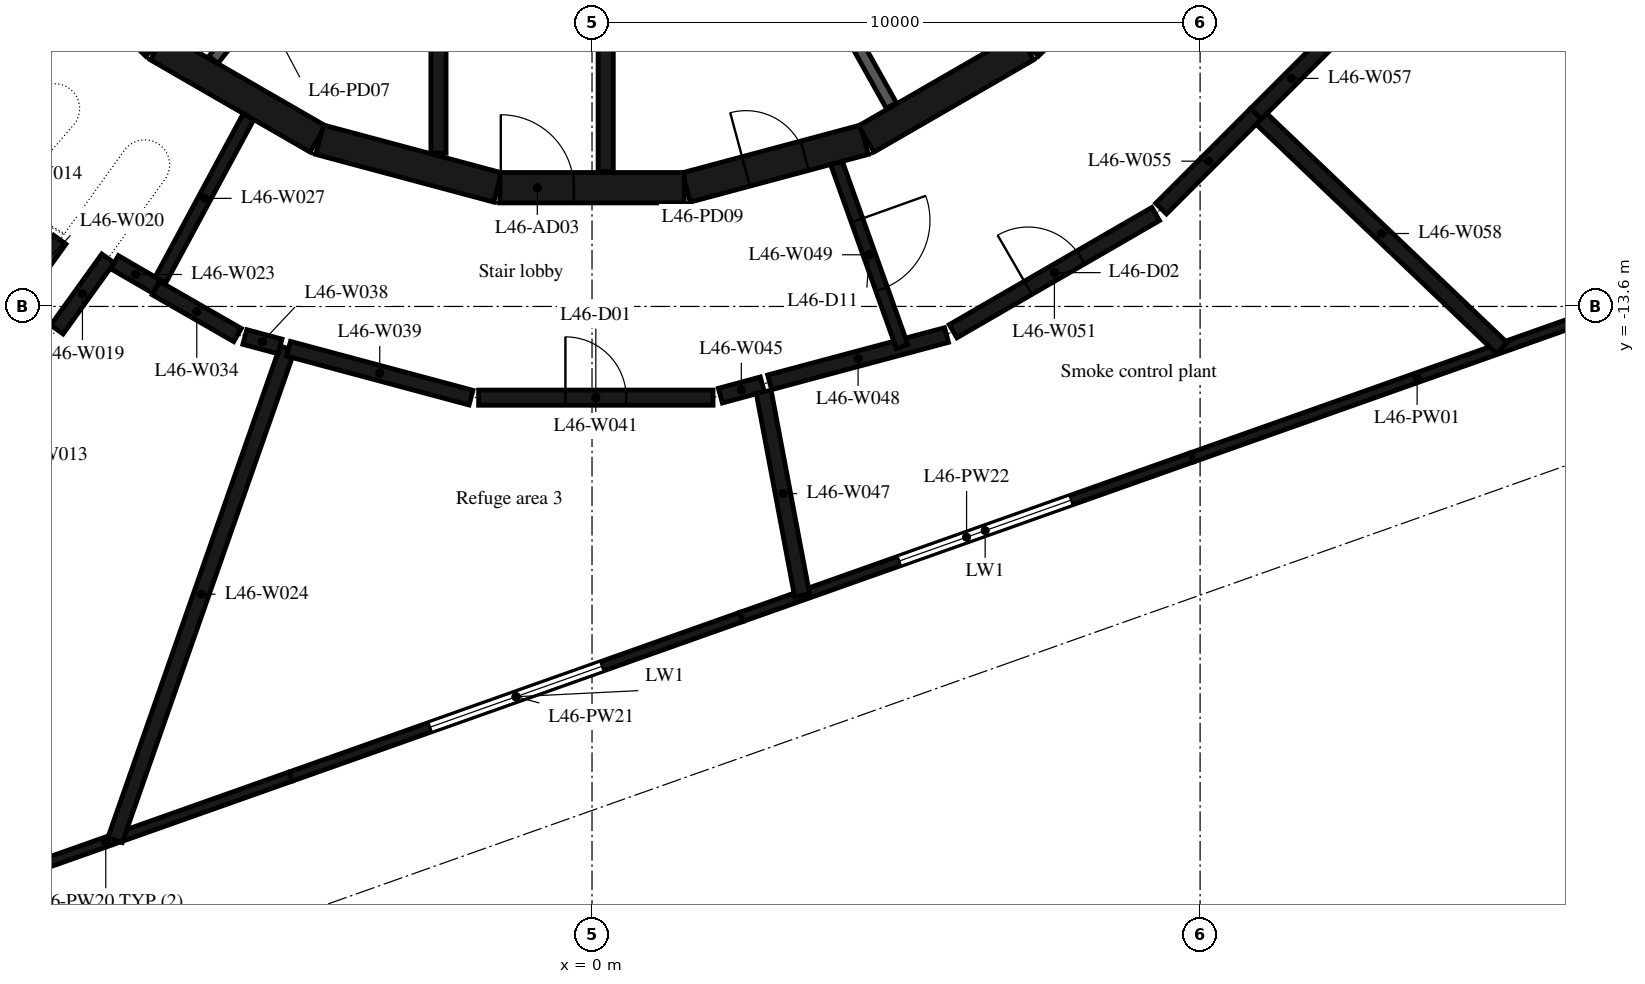
"""IFC4 building model, lengths in metres.
Left out: names, types, materials, properties, quantities, classifications, styles, units other than length and angle.
Written with IfcOpenShell. Run it as: python <this file> out.ifc"""

import sys

from ifc_helpers import new_model, si_unit, direction, frame, frame_2d, origin, place, context, subcontext, project, spatial, rectangle, extrude, element, fill, save


model = new_model("IFC4")
c1 = context("Model", 3, precision=1e-05, world=origin(), true_north=direction((0.0, 1.0)))
c2 = subcontext(c1, "Body", "Model", "MODEL_VIEW")
j1 = project(units=[si_unit("LENGTHUNIT", "METRE"), si_unit("PLANEANGLEUNIT", "RADIAN")], contexts=[c1])
p1 = place(None, origin())
s1 = spatial("IfcSite", under=j1, at=p1, CompositionType="ELEMENT")
p2 = place(p1, origin())
s2 = spatial("IfcBuilding", under=s1, at=p2, CompositionType="ELEMENT")
p3 = place(p2, frame((0.0, 0.0, 183.2)))
s3 = spatial("IfcBuildingStorey", under=s2, at=p3, CompositionType="ELEMENT", Elevation=183.2)
p4 = place(p3, frame((9.864, -16.083, 0.0), z_axis=(0.0, 0.0, 1.0), x_axis=(0.942652676872, 0.333775269883, 0.0)))
e1 = element("IfcWall", 1, at=p4, inside=s3, PredefinedType="STANDARD", context=c2, shape_type="SweptSolid", body=[
    extrude(rectangle(XDim=7.86, YDim=0.16, at=frame_2d((3.93, 0.0))), origin(), (0.0, 0.0, 1.0), 4.75),
])
p5 = place(p3, frame((-11.039, -23.485, 0.0), z_axis=(0.0, 0.0, 1.0), x_axis=(0.94263788719, 0.333817036165, 0.0)))
e2 = element("IfcWall", 2, at=p5, inside=s3, PredefinedType="STANDARD", context=c2, shape_type="SweptSolid", body=[
    extrude(rectangle(XDim=6.455, YDim=0.16, at=frame_2d((3.228, 0.0))), origin(), (0.0, 0.0, 1.0), 4.75),
])
p6 = place(p3, frame((-4.954, -21.33, 0.0), z_axis=(0.0, 0.0, 1.0), x_axis=(0.942639442898, 0.333812643101, 0.0)))
e3 = element("IfcWall", 3, at=p6, inside=s3, PredefinedType="STANDARD", context=c2, shape_type="SweptSolid", body=[
    extrude(rectangle(XDim=7.86, YDim=0.16, at=frame_2d((3.93, 0.0))), origin(), (0.0, 0.0, 1.0), 4.75),
])
p7 = place(p6, frame((2.43, 0.0, 1.0)))
e4 = element("IfcOpeningElement", 4, at=p7, cuts=e3, PredefinedType="OPENING", context=c2, shape_type="SweptSolid", body=[
    extrude(rectangle(XDim=3.0, YDim=2.2, at=frame_2d((1.5, 1.1))), frame((0.0, 0.09, 0.0), z_axis=(0.0, -1.0, 0.0), x_axis=(1.0, 0.0, 0.0)), (0.0, 0.0, 1.0), 0.18),
])
p8 = place(p3, frame((2.455, -18.706, 0.0), z_axis=(0.0, 0.0, 1.0), x_axis=(0.942639442898, 0.333812643101, 0.0)))
e5 = element("IfcWall", 5, at=p8, inside=s3, PredefinedType="STANDARD", context=c2, shape_type="SweptSolid", body=[
    extrude(rectangle(XDim=7.86, YDim=0.16, at=frame_2d((3.93, 0.0))), origin(), (0.0, 0.0, 1.0), 4.75),
])
p9 = place(p8, frame((2.754, 0.0, 1.0)))
e6 = element("IfcOpeningElement", 6, at=p9, cuts=e5, PredefinedType="OPENING", context=c2, shape_type="SweptSolid", body=[
    extrude(rectangle(XDim=3.0, YDim=2.2, at=frame_2d((1.5, 1.1))), frame((0.0, 0.09, 0.0), z_axis=(0.0, -1.0, 0.0), x_axis=(1.0, 0.0, 0.0)), (0.0, 0.0, 1.0), 0.18),
])
p10 = place(p3, frame((1.55, -11.643, 0.0), z_axis=(0.0, 0.0, 1.0), x_axis=(0.965948410781, 0.258734743916, 0.0)))
e7 = element("IfcWall", 7, at=p10, inside=s3, PredefinedType="SHEAR", context=c2, shape_type="SweptSolid", body=[
    extrude(rectangle(XDim=3.033, YDim=0.5, at=frame_2d((1.516, 0.0))), origin(), (0.0, 0.0, 1.0), 4.75),
])
p11 = place(p10, frame((1.016, 0.0, 0.0)))
e8 = element("IfcOpeningElement", 8, at=p11, cuts=e7, PredefinedType="OPENING", context=c2, shape_type="SweptSolid", body=[
    extrude(rectangle(XDim=1.0, YDim=2.4, at=frame_2d((0.5, 1.2))), frame((0.0, 0.26, 0.0), z_axis=(0.0, -1.0, 0.0), x_axis=(1.0, 0.0, 0.0)), (0.0, 0.0, 1.0), 0.52),
])
p12 = place(p3, frame((4.51, -10.845, 0.0), z_axis=(0.0, 0.0, 1.0), x_axis=(0.865975092491, 0.500087131594, 0.0)))
e9 = element("IfcWall", 9, at=p12, inside=s3, PredefinedType="SHEAR", context=c2, shape_type="SweptSolid", body=[
    extrude(rectangle(XDim=3.033, YDim=0.5, at=frame_2d((1.516, 0.0))), origin(), (0.0, 0.0, 1.0), 4.75),
])
p13 = place(p3, frame((7.164, -9.308, 0.0), z_axis=(0.0, 0.0, 1.0), x_axis=(0.707106781187, 0.707106781187, 0.0)))
e10 = element("IfcWall", 10, at=p13, inside=s3, PredefinedType="SHEAR", context=c2, shape_type="SweptSolid", body=[
    extrude(rectangle(XDim=3.032, YDim=0.5, at=frame_2d((1.516, 0.0))), origin(), (0.0, 0.0, 1.0), 4.75),
])
p14 = place(p13, frame((1.016, 0.0, 0.0)))
e11 = element("IfcOpeningElement", 11, at=p14, cuts=e10, PredefinedType="OPENING", context=c2, shape_type="SweptSolid", body=[
    extrude(rectangle(XDim=1.0, YDim=2.4, at=frame_2d((0.5, 1.2))), frame((0.0, 0.26, 0.0), z_axis=(0.0, -1.0, 0.0), x_axis=(1.0, 0.0, 0.0)), (0.0, 0.0, 1.0), 0.52),
])
p15 = place(p3, frame((-9.308, -7.164, 0.0), z_axis=(0.0, 0.0, 1.0), x_axis=(0.707106781187, -0.707106781187, 0.0)))
e12 = element("IfcWall", 12, at=p15, inside=s3, PredefinedType="SHEAR", context=c2, shape_type="SweptSolid", body=[
    extrude(rectangle(XDim=3.032, YDim=0.5, at=frame_2d((1.516, 0.0))), origin(), (0.0, 0.0, 1.0), 4.75),
])
for number, where, z_axis, x_axis in (
    (13, (-7.137, -9.329, 0.0), (0.0, 0.0, 1.0), (0.866, -0.5, 0.0)),
    (14, (-4.479, -10.858, 0.0), (0.0, 0.0, 1.0), (0.966, -0.259, 0.0)),
):
    element("IfcWall", number, at=place(p3, frame(where, z_axis=z_axis, x_axis=x_axis)), inside=s3, PredefinedType="SHEAR", context=c2, shape_type="SweptSolid", body=[
        extrude(rectangle(XDim=3.033, YDim=0.5, at=frame_2d((1.516, 0.0))), origin(), (0.0, 0.0, 1.0), 4.75),
    ])
p16 = place(p3, frame((-1.516, -11.647, 0.0), z_axis=(0.0, 0.0, 1.0), x_axis=(1.0, 0.0, 0.0)))
e15 = element("IfcWall", 15, at=p16, inside=s3, PredefinedType="SHEAR", context=c2, shape_type="SweptSolid", body=[
    extrude(rectangle(XDim=3.033, YDim=0.5, at=frame_2d((1.516, 0.0))), origin(), (0.0, 0.0, 1.0), 4.75),
])
p17 = place(p16, frame((0.016, 0.0, 0.0)))
e16 = element("IfcOpeningElement", 16, at=p17, cuts=e15, PredefinedType="OPENING", context=c2, shape_type="SweptSolid", body=[
    extrude(rectangle(XDim=1.2, YDim=2.1, at=frame_2d((0.6, 1.05))), frame((0.0, 0.26, 0.0), z_axis=(0.0, -1.0, 0.0), x_axis=(1.0, 0.0, 0.0)), (0.0, 0.0, 1.0), 0.52),
])
p18 = place(p3, frame((-2.525, -8.97, 0.0), z_axis=(0.0, 0.0, 1.0), x_axis=(0.0, -1.0, 0.0)))
e17 = element("IfcWall", 17, at=p18, inside=s3, PredefinedType="SHEAR", context=c2, shape_type="SweptSolid", body=[
    extrude(rectangle(XDim=2.11, YDim=0.25, at=frame_2d((1.055, 0.0))), origin(), (0.0, 0.0, 1.0), 4.75),
])
p19 = place(p3, frame((0.225, -8.97, 0.0), z_axis=(0.0, 0.0, 1.0), x_axis=(0.0, -1.0, 0.0)))
e18 = element("IfcWall", 18, at=p19, inside=s3, PredefinedType="SHEAR", context=c2, shape_type="SweptSolid", body=[
    extrude(rectangle(XDim=2.41, YDim=0.25, at=frame_2d((1.205, 0.0))), origin(), (0.0, 0.0, 1.0), 4.75),
])
p20 = place(p3, frame((4.922, -10.296, 0.0), z_axis=(0.0, 0.0, 1.0), x_axis=(-0.48860846254, 0.872503163509, 0.0)))
e19 = element("IfcWall", 19, at=p20, inside=s3, PredefinedType="PARTITIONING", context=c2, shape_type="SweptSolid", body=[
    extrude(rectangle(XDim=1.459, YDim=0.19, at=frame_2d((0.73, 0.0))), origin(), (0.0, 0.0, 1.0), 4.75),
])
p21 = place(p3, frame((-4.706, -7.625, 0.0), z_axis=(0.0, 0.0, 1.0), x_axis=(-0.621392599334, -0.783499353856, 0.0)))
e20 = element("IfcWall", 20, at=p21, inside=s3, PredefinedType="PARTITIONING", context=c2, shape_type="SweptSolid", body=[
    extrude(rectangle(XDim=2.447, YDim=0.19, at=frame_2d((1.224, 0.0))), origin(), (0.0, 0.0, 1.0), 4.75),
])
p22 = place(p21, frame((0.724, 0.0, 0.0)))
e21 = element("IfcOpeningElement", 21, at=p22, cuts=e20, PredefinedType="OPENING", context=c2, shape_type="SweptSolid", body=[
    extrude(rectangle(XDim=1.0, YDim=2.4, at=frame_2d((0.5, 1.2))), frame((0.0, 0.105, 0.0), z_axis=(0.0, -1.0, 0.0), x_axis=(1.0, 0.0, 0.0)), (0.0, 0.0, 1.0), 0.21),
])
p23 = place(p3, frame((-8.8, -13.98, 0.0), z_axis=(0.0, 0.0, 1.0), x_axis=(0.583272745403, 0.812276371976, 0.0)))
e22 = element("IfcWall", 22, at=p23, inside=s3, PredefinedType="PARTITIONING", context=c2, shape_type="SweptSolid", body=[
    extrude(rectangle(XDim=1.44, YDim=0.25, at=frame_2d((0.72, 0.0))), origin(), (0.0, 0.0, 1.0), 4.75),
])
p24 = place(p3, frame((-8.753, -12.501, 0.0), z_axis=(0.0, 0.0, 1.0), x_axis=(-0.583284065891, -0.812268242933, 0.0)))
e23 = element("IfcWall", 23, at=p24, inside=s3, PredefinedType="PARTITIONING", context=c2, shape_type="SweptSolid", body=[
    extrude(rectangle(XDim=1.229, YDim=0.25, at=frame_2d((0.615, 0.0))), origin(), (0.0, 0.0, 1.0), 4.75),
])
p25 = place(p3, frame((-7.852, -12.873, 0.0), z_axis=(0.0, 0.0, 1.0), x_axis=(0.865197326025, -0.501431537739, 0.0)))
e24 = element("IfcWall", 24, at=p25, inside=s3, PredefinedType="PARTITIONING", context=c2, shape_type="SweptSolid", body=[
    extrude(rectangle(XDim=0.803, YDim=0.25, at=frame_2d((0.402, 0.0))), origin(), (0.0, 0.0, 1.0), 4.75),
])
p26 = place(p3, frame((-7.844, -22.375, 0.0), z_axis=(0.0, 0.0, 1.0), x_axis=(0.330759154165, 0.943715201709, 0.0)))
e25 = element("IfcWall", 25, at=p26, inside=s3, PredefinedType="PARTITIONING", context=c2, shape_type="SweptSolid", body=[
    extrude(rectangle(XDim=8.567, YDim=0.25, at=frame_2d((4.283, 0.0))), origin(), (0.0, 0.0, 1.0), 4.75),
])
p27 = place(p3, frame((-7.097, -13.165, 0.0), z_axis=(0.0, 0.0, 1.0), x_axis=(0.474500660471, 0.880255146655, 0.0)))
e26 = element("IfcWall", 26, at=p27, inside=s3, PredefinedType="PARTITIONING", context=c2, shape_type="SweptSolid", body=[
    extrude(rectangle(XDim=3.051, YDim=0.2, at=frame_2d((1.525, 0.0))), origin(), (0.0, 0.0, 1.0), 4.75),
])
p28 = place(p3, frame((-5.83, -14.07, 0.0), z_axis=(0.0, 0.0, 1.0), x_axis=(-0.867015512993, 0.498281145769, 0.0)))
e27 = element("IfcWall", 27, at=p28, inside=s3, PredefinedType="PARTITIONING", context=c2, shape_type="SweptSolid", body=[
    extrude(rectangle(XDim=1.545, YDim=0.25, at=frame_2d((0.773, 0.0))), origin(), (0.0, 0.0, 1.0), 4.75),
])
p29 = place(p3, frame((-5.131, -14.258, 0.0), z_axis=(0.0, 0.0, 1.0), x_axis=(-0.965827909732, 0.259184198561, 0.0)))
e28 = element("IfcWall", 28, at=p29, inside=s3, PredefinedType="PARTITIONING", context=c2, shape_type="SweptSolid", body=[
    extrude(rectangle(XDim=0.599, YDim=0.25, at=frame_2d((0.3, 0.0))), origin(), (0.0, 0.0, 1.0), 4.75),
])
p30 = place(p3, frame((-4.992, -14.295, 0.0), z_axis=(0.0, 0.0, 1.0), x_axis=(0.965855783514, -0.259080306956, 0.0)))
e29 = element("IfcWall", 29, at=p30, inside=s3, PredefinedType="PARTITIONING", context=c2, shape_type="SweptSolid", body=[
    extrude(rectangle(XDim=3.108, YDim=0.25, at=frame_2d((1.554, 0.0))), origin(), (0.0, 0.0, 1.0), 4.75),
])
p31 = place(p3, frame((-1.865, -15.1, 0.0), z_axis=(0.0, 0.0, 1.0), x_axis=(1.0, 0.0, 0.0)))
e30 = element("IfcWall", 30, at=p31, inside=s3, PredefinedType="PARTITIONING", context=c2, shape_type="SweptSolid", body=[
    extrude(rectangle(XDim=3.855, YDim=0.25, at=frame_2d((1.927, 0.0))), origin(), (0.0, 0.0, 1.0), 4.75),
])
p32 = place(p31, frame((1.427, 0.0, 0.0)))
e31 = element("IfcOpeningElement", 31, at=p32, cuts=e30, PredefinedType="OPENING", context=c2, shape_type="SweptSolid", body=[
    extrude(rectangle(XDim=1.0, YDim=2.1, at=frame_2d((0.5, 1.05))), frame((0.0, 0.135, 0.0), z_axis=(0.0, -1.0, 0.0), x_axis=(1.0, 0.0, 0.0)), (0.0, 0.0, 1.0), 0.27),
])
p33 = place(p3, frame((2.111, -15.067, 0.0), z_axis=(0.0, 0.0, 1.0), x_axis=(0.965039301335, 0.262105221007, 0.0)))
e32 = element("IfcWall", 32, at=p33, inside=s3, PredefinedType="PARTITIONING", context=c2, shape_type="SweptSolid", body=[
    extrude(rectangle(XDim=0.714, YDim=0.25, at=frame_2d((0.357, 0.0))), origin(), (0.0, 0.0, 1.0), 4.75),
])
p34 = place(p3, frame((2.823, -15.003, 0.0), z_axis=(0.0, 0.0, 1.0), x_axis=(0.185426134564, -0.98265820539, 0.0)))
e33 = element("IfcWall", 33, at=p34, inside=s3, PredefinedType="PARTITIONING", context=c2, shape_type="SweptSolid", body=[
    extrude(rectangle(XDim=3.407, YDim=0.25, at=frame_2d((1.704, 0.0))), origin(), (0.0, 0.0, 1.0), 4.75),
])
p35 = place(p3, frame((2.921, -14.848, 0.0), z_axis=(0.0, 0.0, 1.0), x_axis=(0.966090816863, 0.258202504969, 0.0)))
e34 = element("IfcWall", 34, at=p35, inside=s3, PredefinedType="PARTITIONING", context=c2, shape_type="SweptSolid", body=[
    extrude(rectangle(XDim=3.011, YDim=0.25, at=frame_2d((1.506, 0.0))), origin(), (0.0, 0.0, 1.0), 4.75),
])
p36 = place(p3, frame((4.02, -11.24, 0.0), z_axis=(0.0, 0.0, 1.0), x_axis=(0.336751058688, -0.941593715183, 0.0)))
e35 = element("IfcWall", 35, at=p36, inside=s3, PredefinedType="PARTITIONING", context=c2, shape_type="SweptSolid", body=[
    extrude(rectangle(XDim=3.207, YDim=0.2, at=frame_2d((1.604, 0.0))), origin(), (0.0, 0.0, 1.0), 4.75),
])
p37 = place(p36, frame((1.004, 0.0, 0.0)))
e36 = element("IfcOpeningElement", 36, at=p37, cuts=e35, PredefinedType="OPENING", context=c2, shape_type="SweptSolid", body=[
    extrude(rectangle(XDim=1.2, YDim=2.1, at=frame_2d((0.6, 1.05))), frame((0.0, 0.11, 0.0), z_axis=(0.0, -1.0, 0.0), x_axis=(1.0, 0.0, 0.0)), (0.0, 0.0, 1.0), 0.22),
])
p38 = place(p3, frame((5.938, -14.007, 0.0), z_axis=(0.0, 0.0, 1.0), x_axis=(0.865615852585, 0.500708693508, 0.0)))
e37 = element("IfcWall", 37, at=p38, inside=s3, PredefinedType="PARTITIONING", context=c2, shape_type="SweptSolid", body=[
    extrude(rectangle(XDim=3.849, YDim=0.25, at=frame_2d((1.925, 0.0))), origin(), (0.0, 0.0, 1.0), 4.75),
])
p39 = place(p38, frame((1.425, 0.0, 0.0)))
e38 = element("IfcOpeningElement", 38, at=p39, cuts=e37, PredefinedType="OPENING", context=c2, shape_type="SweptSolid", body=[
    extrude(rectangle(XDim=1.0, YDim=2.1, at=frame_2d((0.5, 1.05))), frame((0.0, 0.135, 0.0), z_axis=(0.0, -1.0, 0.0), x_axis=(1.0, 0.0, 0.0)), (0.0, 0.0, 1.0), 0.27),
])
p40 = place(p3, frame((9.358, -11.992, 0.0), z_axis=(0.0, 0.0, 1.0), x_axis=(0.707051506082, 0.707162051971, 0.0)))
e39 = element("IfcWall", 39, at=p40, inside=s3, PredefinedType="PARTITIONING", context=c2, shape_type="SweptSolid", body=[
    extrude(rectangle(XDim=2.208, YDim=0.25, at=frame_2d((1.104, 0.0))), origin(), (0.0, 0.0, 1.0), 4.75),
])
p41 = place(p3, frame((10.92, -10.43, 0.0), z_axis=(0.0, 0.0, 1.0), x_axis=(0.707181186066, 0.707032368477, 0.0)))
e40 = element("IfcWall", 40, at=p41, inside=s3, PredefinedType="PARTITIONING", context=c2, shape_type="SweptSolid", body=[
    extrude(rectangle(XDim=1.641, YDim=0.25, at=frame_2d((0.82, 0.0))), origin(), (0.0, 0.0, 1.0), 4.75),
])
p42 = place(p3, frame((11.01, -10.516, 0.0), z_axis=(0.0, 0.0, 1.0), x_axis=(0.723696518253, -0.690118359029, 0.0)))
e41 = element("IfcWall", 41, at=p42, inside=s3, PredefinedType="PARTITIONING", context=c2, shape_type="SweptSolid", body=[
    extrude(rectangle(XDim=5.46, YDim=0.25, at=frame_2d((2.73, 0.0))), origin(), (0.0, 0.0, 1.0), 4.75),
])
p43 = place(p7, origin())
e42 = element("IfcWindow", 42, at=p43, inside=s3, PartitioningType="SINGLE_PANEL", PredefinedType="WINDOW", context=c2, shape_type="SweptSolid", body=[
    extrude(rectangle(XDim=3.0, YDim=2.2, at=frame_2d((1.5, 1.1))), frame((0.0, 0.03, 0.0), z_axis=(0.0, -1.0, 0.0), x_axis=(1.0, 0.0, 0.0)), (0.0, 0.0, 1.0), 0.06),
])
fill(e4, e42)
p44 = place(p9, origin())
e43 = element("IfcWindow", 43, at=p44, inside=s3, PartitioningType="SINGLE_PANEL", PredefinedType="WINDOW", context=c2, shape_type="SweptSolid", body=[
    extrude(rectangle(XDim=3.0, YDim=2.2, at=frame_2d((1.5, 1.1))), frame((0.0, 0.03, 0.0), z_axis=(0.0, -1.0, 0.0), x_axis=(1.0, 0.0, 0.0)), (0.0, 0.0, 1.0), 0.06),
])
fill(e6, e43)
p45 = place(p17, origin())
e44 = element("IfcDoor", 44, at=p45, inside=s3, OperationType="SINGLE_SWING_RIGHT", PredefinedType="DOOR", context=c2, shape_type="SweptSolid", body=[
    extrude(rectangle(XDim=1.2, YDim=2.1, at=frame_2d((0.6, 1.05))), frame((0.0, 0.025, 0.0), z_axis=(0.0, -1.0, 0.0), x_axis=(1.0, 0.0, 0.0)), (0.0, 0.0, 1.0), 0.05),
])
fill(e16, e44)
p46 = place(p11, origin())
e45 = element("IfcDoor", 45, at=p46, inside=s3, OperationType="SINGLE_SWING_LEFT", PredefinedType="DOOR", context=c2, shape_type="SweptSolid", body=[
    extrude(rectangle(XDim=1.0, YDim=2.4, at=frame_2d((0.5, 1.2))), frame((0.0, 0.025, 0.0), z_axis=(0.0, -1.0, 0.0), x_axis=(1.0, 0.0, 0.0)), (0.0, 0.0, 1.0), 0.05),
])
fill(e8, e45)
p47 = place(p32, origin())
e46 = element("IfcDoor", 46, at=p47, inside=s3, OperationType="SINGLE_SWING_LEFT", PredefinedType="DOOR", context=c2, shape_type="SweptSolid", body=[
    extrude(rectangle(XDim=1.0, YDim=2.1, at=frame_2d((0.5, 1.05))), frame((0.0, 0.025, 0.0), z_axis=(0.0, -1.0, 0.0), x_axis=(1.0, 0.0, 0.0)), (0.0, 0.0, 1.0), 0.05),
])
fill(e31, e46)
p48 = place(p39, origin())
e47 = element("IfcDoor", 47, at=p48, inside=s3, OperationType="SINGLE_SWING_LEFT", PredefinedType="DOOR", context=c2, shape_type="SweptSolid", body=[
    extrude(rectangle(XDim=1.0, YDim=2.1, at=frame_2d((0.5, 1.05))), frame((0.0, 0.025, 0.0), z_axis=(0.0, -1.0, 0.0), x_axis=(1.0, 0.0, 0.0)), (0.0, 0.0, 1.0), 0.05),
])
fill(e38, e47)
p49 = place(p37, origin())
e48 = element("IfcDoor", 48, at=p49, inside=s3, OperationType="SINGLE_SWING_LEFT", PredefinedType="DOOR", context=c2, shape_type="SweptSolid", body=[
    extrude(rectangle(XDim=1.2, YDim=2.1, at=frame_2d((0.6, 1.05))), frame((0.0, 0.025, 0.0), z_axis=(0.0, -1.0, 0.0), x_axis=(1.0, 0.0, 0.0)), (0.0, 0.0, 1.0), 0.05),
])
fill(e36, e48)
save(model, sys.argv[1])
